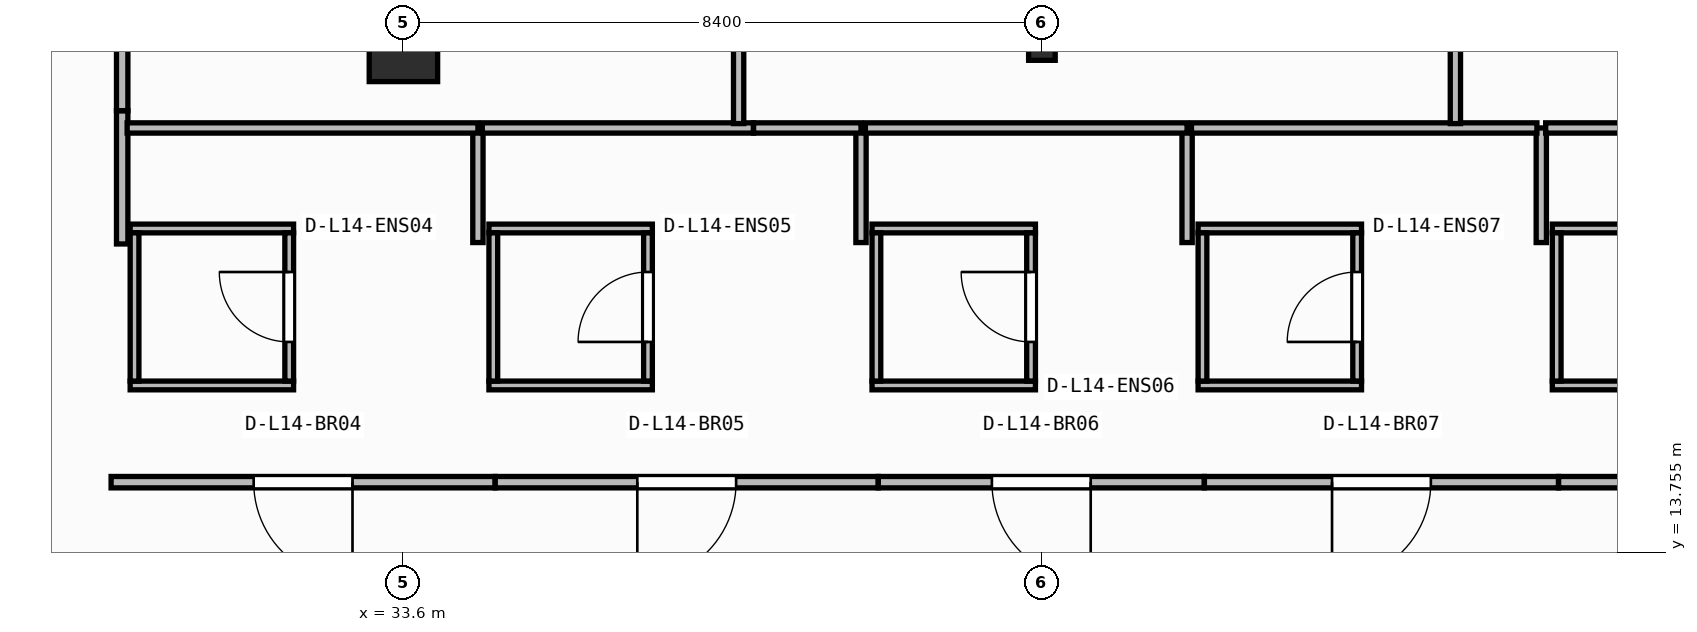
"""IFC4 building model, lengths in metres.
Left out: names, types, materials, properties, quantities, classifications, styles, units other than length and angle.
Written with IfcOpenShell. Run it as: python <this file> out.ifc"""

import sys

from ifc_helpers import new_model, si_unit, direction, frame, frame_2d, origin, origin_2d, place, context, subcontext, project, spatial, rectangle, i_section, extrude, element, fill, save


model = new_model("IFC4")
c1 = context("Model", 3, precision=1e-05, world=origin(), true_north=direction((0.0, 1.0)))
c2 = subcontext(c1, "Body", "Model", "MODEL_VIEW")
j1 = project(units=[si_unit("LENGTHUNIT", "METRE"), si_unit("PLANEANGLEUNIT", "RADIAN")], contexts=[c1])
p1 = place(None, origin())
s1 = spatial("IfcSite", under=j1, at=p1, CompositionType="ELEMENT")
p2 = place(p1, origin())
s2 = spatial("IfcBuilding", under=s1, at=p2, CompositionType="ELEMENT")
p3 = place(p2, frame((0.0, 0.0, 58.05)))
s3 = spatial("IfcBuildingStorey", under=s2, at=p3, CompositionType="ELEMENT", Elevation=58.05)
p4 = place(p3, frame((33.6, 20.4, 0.0), z_axis=(0.0, 0.0, 1.0), x_axis=(1.0, 0.0, 0.0)))
e1 = element("IfcColumn", 1, at=p4, inside=s3, PredefinedType="COLUMN", context=c2, shape_type="SweptSolid", body=[
    extrude(rectangle(XDim=0.9, YDim=0.9, at=origin_2d()), origin(), (0.0, 0.0, 1.0), 3.95),
])
p5 = place(p3, frame((42.0, 20.4, 0.0), z_axis=(0.0, 0.0, 1.0), x_axis=(1.0, 0.0, 0.0)))
e2 = element("IfcColumn", 2, at=p5, inside=s3, PredefinedType="COLUMN", context=c2, shape_type="SweptSolid", body=[
    extrude(i_section(OverallWidth=0.35, OverallDepth=0.34, WebThickness=0.016, FlangeThickness=0.028, at=origin_2d()), origin(), (0.0, 0.0, 1.0), 3.95),
])
p6 = place(p3, frame((30.005, 15.952, 0.0), z_axis=(0.0, 0.0, 1.0), x_axis=(1.0, 0.0, 0.0)))
e3 = element("IfcWall", 3, at=p6, inside=s3, PredefinedType="PARTITIONING", context=c2, shape_type="SweptSolid", body=[
    extrude(rectangle(XDim=2.15, YDim=0.115, at=frame_2d((1.075, 0.0))), origin(), (0.0, 0.0, 1.0), 3.429),
])
p7 = place(p3, frame((30.005, 18.018, 0.0), z_axis=(0.0, 0.0, 1.0), x_axis=(1.0, 0.0, 0.0)))
e4 = element("IfcWall", 4, at=p7, inside=s3, PredefinedType="PARTITIONING", context=c2, shape_type="SweptSolid", body=[
    extrude(rectangle(XDim=2.15, YDim=0.115, at=frame_2d((1.075, 0.0))), origin(), (0.0, 0.0, 1.0), 3.71),
])
p8 = place(p3, frame((30.062, 16.01, 0.0), z_axis=(0.0, 0.0, 1.0), x_axis=(0.0, 1.0, 0.0)))
e5 = element("IfcWall", 5, at=p8, inside=s3, PredefinedType="PARTITIONING", context=c2, shape_type="SweptSolid", body=[
    extrude(rectangle(XDim=1.95, YDim=0.115, at=frame_2d((0.975, 0.0))), origin(), (0.0, 0.0, 1.0), 3.71),
])
p9 = place(p3, frame((32.097, 16.01, 0.0), z_axis=(0.0, 0.0, 1.0), x_axis=(0.0, 1.0, 0.0)))
e6 = element("IfcWall", 6, at=p9, inside=s3, PredefinedType="PARTITIONING", context=c2, shape_type="SweptSolid", body=[
    extrude(rectangle(XDim=1.95, YDim=0.115, at=frame_2d((0.975, 0.0))), origin(), (0.0, 0.0, 1.0), 3.71),
])
p10 = place(p9, frame((0.515, 0.0, 0.0)))
e7 = element("IfcOpeningElement", 7, at=p10, cuts=e6, PredefinedType="OPENING", context=c2, shape_type="SweptSolid", body=[
    extrude(rectangle(XDim=0.92, YDim=2.1, at=frame_2d((0.46, 1.05))), frame((0.0, 0.067, 0.0), z_axis=(0.0, -1.0, 0.0), x_axis=(1.0, 0.0, 0.0)), (0.0, 0.0, 1.0), 0.135),
])
p11 = place(p3, frame((34.725, 15.952, 0.0), z_axis=(0.0, 0.0, 1.0), x_axis=(1.0, 0.0, 0.0)))
e8 = element("IfcWall", 8, at=p11, inside=s3, PredefinedType="PARTITIONING", context=c2, shape_type="SweptSolid", body=[
    extrude(rectangle(XDim=2.15, YDim=0.115, at=frame_2d((1.075, 0.0))), origin(), (0.0, 0.0, 1.0), 3.429),
])
p12 = place(p3, frame((34.725, 18.018, 0.0), z_axis=(0.0, 0.0, 1.0), x_axis=(1.0, 0.0, 0.0)))
e9 = element("IfcWall", 9, at=p12, inside=s3, PredefinedType="PARTITIONING", context=c2, shape_type="SweptSolid", body=[
    extrude(rectangle(XDim=2.15, YDim=0.115, at=frame_2d((1.075, 0.0))), origin(), (0.0, 0.0, 1.0), 3.71),
])
p13 = place(p3, frame((34.782, 16.01, 0.0), z_axis=(0.0, 0.0, 1.0), x_axis=(0.0, 1.0, 0.0)))
e10 = element("IfcWall", 10, at=p13, inside=s3, PredefinedType="PARTITIONING", context=c2, shape_type="SweptSolid", body=[
    extrude(rectangle(XDim=1.95, YDim=0.115, at=frame_2d((0.975, 0.0))), origin(), (0.0, 0.0, 1.0), 3.71),
])
p14 = place(p3, frame((36.817, 16.01, 0.0), z_axis=(0.0, 0.0, 1.0), x_axis=(0.0, 1.0, 0.0)))
e11 = element("IfcWall", 11, at=p14, inside=s3, PredefinedType="PARTITIONING", context=c2, shape_type="SweptSolid", body=[
    extrude(rectangle(XDim=1.95, YDim=0.115, at=frame_2d((0.975, 0.0))), origin(), (0.0, 0.0, 1.0), 3.71),
])
p15 = place(p14, frame((0.515, 0.0, 0.0)))
e12 = element("IfcOpeningElement", 12, at=p15, cuts=e11, PredefinedType="OPENING", context=c2, shape_type="SweptSolid", body=[
    extrude(rectangle(XDim=0.92, YDim=2.1, at=frame_2d((0.46, 1.05))), frame((0.0, 0.067, 0.0), z_axis=(0.0, -1.0, 0.0), x_axis=(1.0, 0.0, 0.0)), (0.0, 0.0, 1.0), 0.135),
])
p16 = place(p3, frame((39.765, 15.952, 0.0), z_axis=(0.0, 0.0, 1.0), x_axis=(1.0, 0.0, 0.0)))
e13 = element("IfcWall", 13, at=p16, inside=s3, PredefinedType="PARTITIONING", context=c2, shape_type="SweptSolid", body=[
    extrude(rectangle(XDim=2.15, YDim=0.115, at=frame_2d((1.075, 0.0))), origin(), (0.0, 0.0, 1.0), 3.429),
])
p17 = place(p3, frame((39.765, 18.018, 0.0), z_axis=(0.0, 0.0, 1.0), x_axis=(1.0, 0.0, 0.0)))
e14 = element("IfcWall", 14, at=p17, inside=s3, PredefinedType="PARTITIONING", context=c2, shape_type="SweptSolid", body=[
    extrude(rectangle(XDim=2.15, YDim=0.115, at=frame_2d((1.075, 0.0))), origin(), (0.0, 0.0, 1.0), 3.71),
])
p18 = place(p3, frame((39.823, 16.01, 0.0), z_axis=(0.0, 0.0, 1.0), x_axis=(0.0, 1.0, 0.0)))
e15 = element("IfcWall", 15, at=p18, inside=s3, PredefinedType="PARTITIONING", context=c2, shape_type="SweptSolid", body=[
    extrude(rectangle(XDim=1.95, YDim=0.115, at=frame_2d((0.975, 0.0))), origin(), (0.0, 0.0, 1.0), 3.71),
])
p19 = place(p3, frame((41.857, 16.01, 0.0), z_axis=(0.0, 0.0, 1.0), x_axis=(0.0, 1.0, 0.0)))
e16 = element("IfcWall", 16, at=p19, inside=s3, PredefinedType="PARTITIONING", context=c2, shape_type="SweptSolid", body=[
    extrude(rectangle(XDim=1.95, YDim=0.115, at=frame_2d((0.975, 0.0))), origin(), (0.0, 0.0, 1.0), 3.073),
])
p20 = place(p19, frame((0.515, 0.0, 0.0)))
e17 = element("IfcOpeningElement", 17, at=p20, cuts=e16, PredefinedType="OPENING", context=c2, shape_type="SweptSolid", body=[
    extrude(rectangle(XDim=0.92, YDim=2.1, at=frame_2d((0.46, 1.05))), frame((0.0, 0.067, 0.0), z_axis=(0.0, -1.0, 0.0), x_axis=(1.0, 0.0, 0.0)), (0.0, 0.0, 1.0), 0.135),
])
p21 = place(p3, frame((44.055, 15.952, 0.0), z_axis=(0.0, 0.0, 1.0), x_axis=(1.0, 0.0, 0.0)))
e18 = element("IfcWall", 18, at=p21, inside=s3, PredefinedType="PARTITIONING", context=c2, shape_type="SweptSolid", body=[
    extrude(rectangle(XDim=2.15, YDim=0.115, at=frame_2d((1.075, 0.0))), origin(), (0.0, 0.0, 1.0), 3.429),
])
p22 = place(p3, frame((44.055, 18.018, 0.0), z_axis=(0.0, 0.0, 1.0), x_axis=(1.0, 0.0, 0.0)))
e19 = element("IfcWall", 19, at=p22, inside=s3, PredefinedType="PARTITIONING", context=c2, shape_type="SweptSolid", body=[
    extrude(rectangle(XDim=2.15, YDim=0.115, at=frame_2d((1.075, 0.0))), origin(), (0.0, 0.0, 1.0), 3.71),
])
p23 = place(p3, frame((44.113, 16.01, 0.0), z_axis=(0.0, 0.0, 1.0), x_axis=(0.0, 1.0, 0.0)))
e20 = element("IfcWall", 20, at=p23, inside=s3, PredefinedType="PARTITIONING", context=c2, shape_type="SweptSolid", body=[
    extrude(rectangle(XDim=1.95, YDim=0.115, at=frame_2d((0.975, 0.0))), origin(), (0.0, 0.0, 1.0), 3.71),
])
p24 = place(p3, frame((46.147, 16.01, 0.0), z_axis=(0.0, 0.0, 1.0), x_axis=(0.0, 1.0, 0.0)))
e21 = element("IfcWall", 21, at=p24, inside=s3, PredefinedType="PARTITIONING", context=c2, shape_type="SweptSolid", body=[
    extrude(rectangle(XDim=1.95, YDim=0.115, at=frame_2d((0.975, 0.0))), origin(), (0.0, 0.0, 1.0), 3.71),
])
p25 = place(p24, frame((0.515, 0.0, 0.0)))
e22 = element("IfcOpeningElement", 22, at=p25, cuts=e21, PredefinedType="OPENING", context=c2, shape_type="SweptSolid", body=[
    extrude(rectangle(XDim=0.92, YDim=2.1, at=frame_2d((0.46, 1.05))), frame((0.0, 0.067, 0.0), z_axis=(0.0, -1.0, 0.0), x_axis=(1.0, 0.0, 0.0)), (0.0, 0.0, 1.0), 0.135),
])
p26 = place(p3, frame((48.715, 15.952, 0.0), z_axis=(0.0, 0.0, 1.0), x_axis=(1.0, 0.0, 0.0)))
e23 = element("IfcWall", 23, at=p26, inside=s3, PredefinedType="PARTITIONING", context=c2, shape_type="SweptSolid", body=[
    extrude(rectangle(XDim=2.15, YDim=0.115, at=frame_2d((1.075, 0.0))), origin(), (0.0, 0.0, 1.0), 3.429),
])
p27 = place(p3, frame((48.715, 18.018, 0.0), z_axis=(0.0, 0.0, 1.0), x_axis=(1.0, 0.0, 0.0)))
e24 = element("IfcWall", 24, at=p27, inside=s3, PredefinedType="PARTITIONING", context=c2, shape_type="SweptSolid", body=[
    extrude(rectangle(XDim=2.15, YDim=0.115, at=frame_2d((1.075, 0.0))), origin(), (0.0, 0.0, 1.0), 3.71),
])
p28 = place(p3, frame((48.772, 16.01, 0.0), z_axis=(0.0, 0.0, 1.0), x_axis=(0.0, 1.0, 0.0)))
e25 = element("IfcWall", 25, at=p28, inside=s3, PredefinedType="PARTITIONING", context=c2, shape_type="SweptSolid", body=[
    extrude(rectangle(XDim=1.95, YDim=0.115, at=frame_2d((0.975, 0.0))), origin(), (0.0, 0.0, 1.0), 3.71),
])
p29 = place(p3, frame((34.806, 14.68, 0.0), z_axis=(0.0, 0.0, 1.0), x_axis=(-1.0, 0.0, 0.0)))
e26 = element("IfcWall", 26, at=p29, inside=s3, PredefinedType="PARTITIONING", context=c2, shape_type="SweptSolid", body=[
    extrude(rectangle(XDim=5.052, YDim=0.15, at=frame_2d((2.526, 0.0))), origin(), (0.0, 0.0, 1.0), 3.71),
])
p30 = place(p29, frame((1.876, 0.0, 0.0)))
e27 = element("IfcOpeningElement", 27, at=p30, cuts=e26, PredefinedType="OPENING", context=c2, shape_type="SweptSolid", body=[
    extrude(rectangle(XDim=1.3, YDim=2.15, at=frame_2d((0.65, 1.075))), frame((0.0, 0.085, 0.0), z_axis=(0.0, -1.0, 0.0), x_axis=(1.0, 0.0, 0.0)), (0.0, 0.0, 1.0), 0.17),
])
p31 = place(p3, frame((39.846, 14.68, 0.0), z_axis=(0.0, 0.0, 1.0), x_axis=(-1.0, 0.0, 0.0)))
e28 = element("IfcWall", 28, at=p31, inside=s3, PredefinedType="PARTITIONING", context=c2, shape_type="SweptSolid", body=[
    extrude(rectangle(XDim=5.038, YDim=0.15, at=frame_2d((2.519, 0.0))), origin(), (0.0, 0.0, 1.0), 3.71),
])
p32 = place(p31, frame((1.869, 0.0, 0.0)))
e29 = element("IfcOpeningElement", 29, at=p32, cuts=e28, PredefinedType="OPENING", context=c2, shape_type="SweptSolid", body=[
    extrude(rectangle(XDim=1.3, YDim=2.15, at=frame_2d((0.65, 1.075))), frame((0.0, 0.085, 0.0), z_axis=(0.0, -1.0, 0.0), x_axis=(1.0, 0.0, 0.0)), (0.0, 0.0, 1.0), 0.17),
])
p33 = place(p3, frame((44.136, 14.68, 0.0), z_axis=(0.0, 0.0, 1.0), x_axis=(-1.0, 0.0, 0.0)))
e30 = element("IfcWall", 30, at=p33, inside=s3, PredefinedType="PARTITIONING", context=c2, shape_type="SweptSolid", body=[
    extrude(rectangle(XDim=4.288, YDim=0.15, at=frame_2d((2.144, 0.0))), origin(), (0.0, 0.0, 1.0), 3.71),
])
p34 = place(p33, frame((1.494, 0.0, 0.0)))
e31 = element("IfcOpeningElement", 31, at=p34, cuts=e30, PredefinedType="OPENING", context=c2, shape_type="SweptSolid", body=[
    extrude(rectangle(XDim=1.3, YDim=2.15, at=frame_2d((0.65, 1.075))), frame((0.0, 0.085, 0.0), z_axis=(0.0, -1.0, 0.0), x_axis=(1.0, 0.0, 0.0)), (0.0, 0.0, 1.0), 0.17),
])
p35 = place(p3, frame((48.796, 14.68, 0.0), z_axis=(0.0, 0.0, 1.0), x_axis=(-1.0, 0.0, 0.0)))
e32 = element("IfcWall", 32, at=p35, inside=s3, PredefinedType="PARTITIONING", context=c2, shape_type="SweptSolid", body=[
    extrude(rectangle(XDim=4.658, YDim=0.15, at=frame_2d((2.329, 0.0))), origin(), (0.0, 0.0, 1.0), 3.71),
])
p36 = place(p35, frame((1.679, 0.0, 0.0)))
e33 = element("IfcOpeningElement", 33, at=p36, cuts=e32, PredefinedType="OPENING", context=c2, shape_type="SweptSolid", body=[
    extrude(rectangle(XDim=1.3, YDim=2.15, at=frame_2d((0.65, 1.075))), frame((0.0, 0.085, 0.0), z_axis=(0.0, -1.0, 0.0), x_axis=(1.0, 0.0, 0.0)), (0.0, 0.0, 1.0), 0.17),
])
p37 = place(p3, frame((53.836, 14.68, 0.0), z_axis=(0.0, 0.0, 1.0), x_axis=(-1.0, 0.0, 0.0)))
e34 = element("IfcWall", 34, at=p37, inside=s3, PredefinedType="PARTITIONING", context=c2, shape_type="SweptSolid", body=[
    extrude(rectangle(XDim=5.038, YDim=0.15, at=frame_2d((2.519, 0.0))), origin(), (0.0, 0.0, 1.0), 3.71),
])
p38 = place(p37, frame((1.869, 0.0, 0.0)))
e35 = element("IfcOpeningElement", 35, at=p38, cuts=e34, PredefinedType="OPENING", context=c2, shape_type="SweptSolid", body=[
    extrude(rectangle(XDim=1.3, YDim=2.15, at=frame_2d((0.65, 1.075))), frame((0.0, 0.085, 0.0), z_axis=(0.0, -1.0, 0.0), x_axis=(1.0, 0.0, 0.0)), (0.0, 0.0, 1.0), 0.17),
])
p39 = place(p3, frame((29.9, 17.814, 0.0), z_axis=(0.0, 0.0, 1.0), x_axis=(0.0, 1.0, 0.0)))
e36 = element("IfcWall", 36, at=p39, inside=s3, PredefinedType="PARTITIONING", context=c2, shape_type="SweptSolid", body=[
    extrude(rectangle(XDim=1.752, YDim=0.15, at=frame_2d((0.876, 0.0))), origin(), (0.0, 0.0, 1.0), 3.71),
])
p40 = place(p3, frame((29.9, 19.568, 0.0), z_axis=(0.0, 0.0, 1.0), x_axis=(0.0, 1.0, 0.0)))
e37 = element("IfcWall", 37, at=p40, inside=s3, PredefinedType="PARTITIONING", context=c2, shape_type="SweptSolid", body=[
    extrude(rectangle(XDim=9.432, YDim=0.15, at=frame_2d((4.716, 0.0))), origin(), (0.0, 0.0, 1.0), 3.71),
])
p41 = place(p40, frame((4.166, 0.0, 0.0)))
e38 = element("IfcOpeningElement", 38, at=p41, cuts=e37, PredefinedType="OPENING", context=c2, shape_type="SweptSolid", body=[
    extrude(rectangle(XDim=1.1, YDim=2.1, at=frame_2d((0.55, 1.05))), frame((0.0, 0.085, 0.0), z_axis=(0.0, -1.0, 0.0), x_axis=(1.0, 0.0, 0.0)), (0.0, 0.0, 1.0), 0.17),
])
p42 = place(p3, frame((34.58, 17.833, 0.0), z_axis=(0.0, 0.0, 1.0), x_axis=(0.0, 1.0, 0.0)))
e39 = element("IfcWall", 39, at=p42, inside=s3, PredefinedType="PARTITIONING", context=c2, shape_type="SweptSolid", body=[
    extrude(rectangle(XDim=1.508, YDim=0.135, at=frame_2d((0.754, 0.0))), origin(), (0.0, 0.0, 1.0), 3.71),
])
p43 = place(p3, frame((34.58, 19.34, 0.0), z_axis=(0.0, 0.0, 1.0), x_axis=(-1.0, 0.0, 0.0)))
e40 = element("IfcWall", 40, at=p43, inside=s3, PredefinedType="PARTITIONING", context=c2, shape_type="SweptSolid", body=[
    extrude(rectangle(XDim=4.615, YDim=0.135, at=frame_2d((2.308, 0.0))), origin(), (0.0, 0.0, 1.0), 3.71),
])
p44 = place(p3, frame((39.62, 17.833, 0.0), z_axis=(0.0, 0.0, 1.0), x_axis=(0.0, 1.0, 0.0)))
e41 = element("IfcWall", 41, at=p44, inside=s3, PredefinedType="PARTITIONING", context=c2, shape_type="SweptSolid", body=[
    extrude(rectangle(XDim=1.508, YDim=0.135, at=frame_2d((0.754, 0.0))), origin(), (0.0, 0.0, 1.0), 3.71),
])
p45 = place(p3, frame((38.205, 19.34, 0.0), z_axis=(0.0, 0.0, 1.0), x_axis=(-1.0, 0.0, 0.0)))
e42 = element("IfcWall", 42, at=p45, inside=s3, PredefinedType="PARTITIONING", context=c2, shape_type="SweptSolid", body=[
    extrude(rectangle(XDim=3.567, YDim=0.135, at=frame_2d((1.784, 0.0))), origin(), (0.0, 0.0, 1.0), 3.71),
])
p46 = place(p3, frame((39.62, 19.34, 0.0), z_axis=(0.0, 0.0, 1.0), x_axis=(-1.0, 0.0, 0.0)))
e43 = element("IfcWall", 43, at=p46, inside=s3, PredefinedType="PARTITIONING", context=c2, shape_type="SweptSolid", body=[
    extrude(rectangle(XDim=1.414, YDim=0.135, at=frame_2d((0.707, 0.0))), origin(), (0.0, 0.0, 1.0), 3.71),
])
p47 = place(p3, frame((43.91, 17.833, 0.0), z_axis=(0.0, 0.0, 1.0), x_axis=(0.0, 1.0, 0.0)))
e44 = element("IfcWall", 44, at=p47, inside=s3, PredefinedType="PARTITIONING", context=c2, shape_type="SweptSolid", body=[
    extrude(rectangle(XDim=1.508, YDim=0.135, at=frame_2d((0.754, 0.0))), origin(), (0.0, 0.0, 1.0), 3.71),
])
p48 = place(p3, frame((43.91, 19.34, 0.0), z_axis=(0.0, 0.0, 1.0), x_axis=(-1.0, 0.0, 0.0)))
e45 = element("IfcWall", 45, at=p48, inside=s3, PredefinedType="PARTITIONING", context=c2, shape_type="SweptSolid", body=[
    extrude(rectangle(XDim=4.232, YDim=0.135, at=frame_2d((2.116, 0.0))), origin(), (0.0, 0.0, 1.0), 3.71),
])
p49 = place(p3, frame((48.57, 17.833, 0.0), z_axis=(0.0, 0.0, 1.0), x_axis=(0.0, 1.0, 0.0)))
e46 = element("IfcWall", 46, at=p49, inside=s3, PredefinedType="PARTITIONING", context=c2, shape_type="SweptSolid", body=[
    extrude(rectangle(XDim=1.508, YDim=0.135, at=frame_2d((0.754, 0.0))), origin(), (0.0, 0.0, 1.0), 3.71),
])
p50 = place(p3, frame((48.512, 19.34, 0.0), z_axis=(0.0, 0.0, 1.0), x_axis=(-1.0, 0.0, 0.0)))
e47 = element("IfcWall", 47, at=p50, inside=s3, PredefinedType="PARTITIONING", context=c2, shape_type="SweptSolid", body=[
    extrude(rectangle(XDim=4.545, YDim=0.135, at=frame_2d((2.272, 0.0))), origin(), (0.0, 0.0, 1.0), 3.71),
])
p51 = place(p3, frame((52.195, 19.34, 0.0), z_axis=(0.0, 0.0, 1.0), x_axis=(-1.0, 0.0, 0.0)))
e48 = element("IfcWall", 48, at=p51, inside=s3, PredefinedType="PARTITIONING", context=c2, shape_type="SweptSolid", body=[
    extrude(rectangle(XDim=3.567, YDim=0.135, at=frame_2d((1.784, 0.0))), origin(), (0.0, 0.0, 1.0), 3.71),
])
p52 = place(p3, frame((38.01, 19.397, 0.0), z_axis=(0.0, 0.0, 1.0), x_axis=(0.0, 1.0, 0.0)))
e49 = element("IfcWall", 49, at=p52, inside=s3, PredefinedType="PARTITIONING", context=c2, shape_type="SweptSolid", body=[
    extrude(rectangle(XDim=9.522, YDim=0.135, at=frame_2d((4.761, 0.0))), origin(), (0.0, 0.0, 1.0), 3.71),
])
p53 = place(p52, frame((4.211, 0.0, 0.0)))
e50 = element("IfcOpeningElement", 50, at=p53, cuts=e49, PredefinedType="OPENING", context=c2, shape_type="SweptSolid", body=[
    extrude(rectangle(XDim=1.1, YDim=2.1, at=frame_2d((0.55, 1.05))), frame((0.0, 0.077, 0.0), z_axis=(0.0, -1.0, 0.0), x_axis=(1.0, 0.0, 0.0)), (0.0, 0.0, 1.0), 0.155),
])
p54 = place(p3, frame((47.44, 19.397, 0.0), z_axis=(0.0, 0.0, 1.0), x_axis=(0.0, 1.0, 0.0)))
e51 = element("IfcWall", 51, at=p54, inside=s3, PredefinedType="PARTITIONING", context=c2, shape_type="SweptSolid", body=[
    extrude(rectangle(XDim=9.522, YDim=0.135, at=frame_2d((4.761, 0.0))), origin(), (0.0, 0.0, 1.0), 3.71),
])
p55 = place(p54, frame((4.211, 0.0, 0.0)))
e52 = element("IfcOpeningElement", 52, at=p55, cuts=e51, PredefinedType="OPENING", context=c2, shape_type="SweptSolid", body=[
    extrude(rectangle(XDim=1.1, YDim=2.1, at=frame_2d((0.55, 1.05))), frame((0.0, 0.077, 0.0), z_axis=(0.0, -1.0, 0.0), x_axis=(1.0, 0.0, 0.0)), (0.0, 0.0, 1.0), 0.155),
])
p56 = place(p10, origin())
e53 = element("IfcDoor", 53, at=p56, inside=s3, OperationType="SINGLE_SWING_RIGHT", PredefinedType="DOOR", context=c2, shape_type="SweptSolid", body=[
    extrude(rectangle(XDim=0.92, YDim=2.1, at=frame_2d((0.46, 1.05))), frame((0.0, 0.025, 0.0), z_axis=(0.0, -1.0, 0.0), x_axis=(1.0, 0.0, 0.0)), (0.0, 0.0, 1.0), 0.05),
])
fill(e7, e53)
p57 = place(p15, origin())
e54 = element("IfcDoor", 54, at=p57, inside=s3, OperationType="SINGLE_SWING_LEFT", PredefinedType="DOOR", context=c2, shape_type="SweptSolid", body=[
    extrude(rectangle(XDim=0.92, YDim=2.1, at=frame_2d((0.46, 1.05))), frame((0.0, 0.025, 0.0), z_axis=(0.0, -1.0, 0.0), x_axis=(1.0, 0.0, 0.0)), (0.0, 0.0, 1.0), 0.05),
])
fill(e12, e54)
p58 = place(p20, origin())
e55 = element("IfcDoor", 55, at=p58, inside=s3, OperationType="SINGLE_SWING_RIGHT", PredefinedType="DOOR", context=c2, shape_type="SweptSolid", body=[
    extrude(rectangle(XDim=0.92, YDim=2.1, at=frame_2d((0.46, 1.05))), frame((0.0, 0.025, 0.0), z_axis=(0.0, -1.0, 0.0), x_axis=(1.0, 0.0, 0.0)), (0.0, 0.0, 1.0), 0.05),
])
fill(e17, e55)
p59 = place(p25, origin())
e56 = element("IfcDoor", 56, at=p59, inside=s3, OperationType="SINGLE_SWING_LEFT", PredefinedType="DOOR", context=c2, shape_type="SweptSolid", body=[
    extrude(rectangle(XDim=0.92, YDim=2.1, at=frame_2d((0.46, 1.05))), frame((0.0, 0.025, 0.0), z_axis=(0.0, -1.0, 0.0), x_axis=(1.0, 0.0, 0.0)), (0.0, 0.0, 1.0), 0.05),
])
fill(e22, e56)
p60 = place(p30, origin())
e57 = element("IfcDoor", 57, at=p60, inside=s3, OperationType="SINGLE_SWING_LEFT", PredefinedType="DOOR", context=c2, shape_type="SweptSolid", body=[
    extrude(rectangle(XDim=1.3, YDim=2.15, at=frame_2d((0.65, 1.075))), frame((0.0, 0.025, 0.0), z_axis=(0.0, -1.0, 0.0), x_axis=(1.0, 0.0, 0.0)), (0.0, 0.0, 1.0), 0.05),
])
fill(e27, e57)
p61 = place(p32, origin())
e58 = element("IfcDoor", 58, at=p61, inside=s3, OperationType="SINGLE_SWING_RIGHT", PredefinedType="DOOR", context=c2, shape_type="SweptSolid", body=[
    extrude(rectangle(XDim=1.3, YDim=2.15, at=frame_2d((0.65, 1.075))), frame((0.0, 0.025, 0.0), z_axis=(0.0, -1.0, 0.0), x_axis=(1.0, 0.0, 0.0)), (0.0, 0.0, 1.0), 0.05),
])
fill(e29, e58)
p62 = place(p34, origin())
e59 = element("IfcDoor", 59, at=p62, inside=s3, OperationType="SINGLE_SWING_LEFT", PredefinedType="DOOR", context=c2, shape_type="SweptSolid", body=[
    extrude(rectangle(XDim=1.3, YDim=2.15, at=frame_2d((0.65, 1.075))), frame((0.0, 0.025, 0.0), z_axis=(0.0, -1.0, 0.0), x_axis=(1.0, 0.0, 0.0)), (0.0, 0.0, 1.0), 0.05),
])
fill(e31, e59)
p63 = place(p36, origin())
e60 = element("IfcDoor", 60, at=p63, inside=s3, OperationType="SINGLE_SWING_RIGHT", PredefinedType="DOOR", context=c2, shape_type="SweptSolid", body=[
    extrude(rectangle(XDim=1.3, YDim=2.15, at=frame_2d((0.65, 1.075))), frame((0.0, 0.025, 0.0), z_axis=(0.0, -1.0, 0.0), x_axis=(1.0, 0.0, 0.0)), (0.0, 0.0, 1.0), 0.05),
])
fill(e33, e60)
save(model, sys.argv[1])
